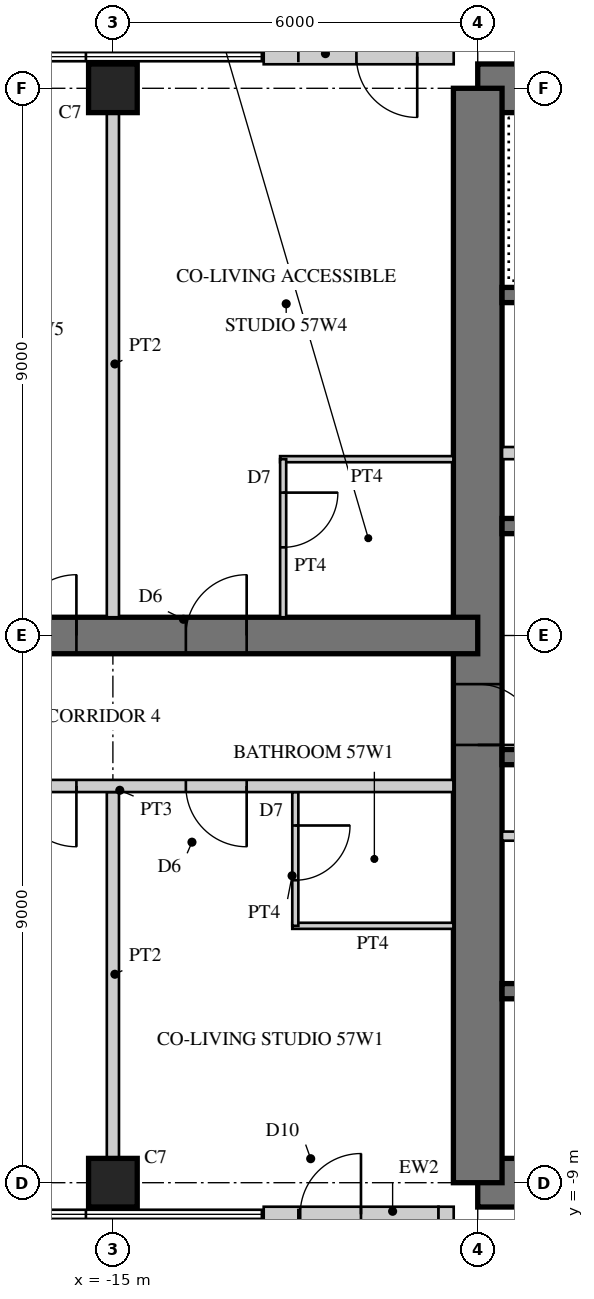
"""IFC4 building model, lengths in metres.
Left out: names, types, materials, properties, quantities, classifications, styles, units other than length and angle.
Written with IfcOpenShell. Run it as: python <this file> out.ifc"""

import sys

from ifc_helpers import new_model, si_unit, direction, frame, frame_2d, origin, origin_2d, place, context, subcontext, project, spatial, rectangle, hollow_rectangle, extrude, element, fill, save


model = new_model("IFC4")
c1 = context("Model", 3, precision=1e-05, world=origin(), true_north=direction((0.0, 1.0)))
c2 = subcontext(c1, "Body", "Model", "MODEL_VIEW")
j1 = project(units=[si_unit("LENGTHUNIT", "METRE"), si_unit("PLANEANGLEUNIT", "RADIAN")], contexts=[c1])
p1 = place(None, origin())
s1 = spatial("IfcSite", under=j1, at=p1, CompositionType="ELEMENT")
p2 = place(p1, origin())
s2 = spatial("IfcBuilding", under=s1, at=p2, CompositionType="ELEMENT")
p3 = place(p2, frame((0.0, 0.0, 225.5)))
s3 = spatial("IfcBuildingStorey", under=s2, at=p3, CompositionType="ELEMENT", Elevation=225.5)
p4 = place(p3, frame((9.0, 9.0, 0.0), z_axis=(0.0, 0.0, 1.0), x_axis=(-1.0, 0.0, 0.0)))
e1 = element("IfcWall", 1, at=p4, inside=s3, PredefinedType="SHEAR", context=c2, shape_type="SweptSolid", body=[
    extrude(rectangle(XDim=18.0, YDim=0.8, at=frame_2d((9.0, 0.0))), origin(), (0.0, 0.0, 1.0), 3.4),
])
p5 = place(p4, frame((9.8, 0.0, 0.0)))
e2 = element("IfcOpeningElement", 2, at=p5, cuts=e1, PredefinedType="OPENING", context=c2, shape_type="SweptSolid", body=[
    extrude(rectangle(XDim=1.0, YDim=2.4, at=frame_2d((0.5, 1.2))), frame((0.0, 0.41, 0.0), z_axis=(0.0, -1.0, 0.0), x_axis=(1.0, 0.0, 0.0)), (0.0, 0.0, 1.0), 0.82),
])
p6 = place(p3, frame((-9.0, -9.0, 0.0), z_axis=(0.0, 0.0, 1.0), x_axis=(1.0, 0.0, 0.0)))
e3 = element("IfcWall", 3, at=p6, inside=s3, PredefinedType="SHEAR", context=c2, shape_type="SweptSolid", body=[
    extrude(rectangle(XDim=18.0, YDim=0.8, at=frame_2d((9.0, 0.0))), origin(), (0.0, 0.0, 1.0), 3.4),
])
p7 = place(p6, frame((9.8, 0.0, 0.0)))
e4 = element("IfcOpeningElement", 4, at=p7, cuts=e3, PredefinedType="OPENING", context=c2, shape_type="SweptSolid", body=[
    extrude(rectangle(XDim=1.0, YDim=2.4, at=frame_2d((0.5, 1.2))), frame((0.0, 0.41, 0.0), z_axis=(0.0, -1.0, 0.0), x_axis=(1.0, 0.0, 0.0)), (0.0, 0.0, 1.0), 0.82),
])
p8 = place(p3, frame((-9.0, 9.0, 0.0), z_axis=(0.0, 0.0, 1.0), x_axis=(0.0, -1.0, 0.0)))
e5 = element("IfcWall", 5, at=p8, inside=s3, PredefinedType="SHEAR", context=c2, shape_type="SweptSolid", body=[
    extrude(rectangle(XDim=18.0, YDim=0.8, at=frame_2d((9.0, 0.0))), origin(), (0.0, 0.0, 1.0), 3.4),
])
p9 = place(p8, frame((9.8, 0.0, 0.0)))
e6 = element("IfcOpeningElement", 6, at=p9, cuts=e5, PredefinedType="OPENING", context=c2, shape_type="SweptSolid", body=[
    extrude(rectangle(XDim=1.0, YDim=2.4, at=frame_2d((0.5, 1.2))), frame((0.0, 0.41, 0.0), z_axis=(0.0, -1.0, 0.0), x_axis=(1.0, 0.0, 0.0)), (0.0, 0.0, 1.0), 0.82),
])
p10 = place(p3, frame((-2.125, 1.8, 0.0), z_axis=(0.0, 0.0, 1.0), x_axis=(-1.0, 0.0, 0.0)))
e7 = element("IfcWall", 7, at=p10, inside=s3, PredefinedType="SHEAR", context=c2, shape_type="SweptSolid", body=[
    extrude(rectangle(XDim=6.475, YDim=0.25, at=frame_2d((3.238, 0.0))), origin(), (0.0, 0.0, 1.0), 3.4),
])
p11 = place(p3, frame((-2.125, 5.6, 0.0), z_axis=(0.0, 0.0, 1.0), x_axis=(-1.0, 0.0, 0.0)))
e8 = element("IfcWall", 8, at=p11, inside=s3, PredefinedType="SHEAR", context=c2, shape_type="SweptSolid", body=[
    extrude(rectangle(XDim=6.475, YDim=0.25, at=frame_2d((3.238, 0.0))), origin(), (0.0, 0.0, 1.0), 3.4),
])
p12 = place(p11, frame((0.175, 0.0, 0.0)))
e9 = element("IfcOpeningElement", 9, at=p12, cuts=e8, PredefinedType="OPENING", context=c2, shape_type="SweptSolid", body=[
    extrude(rectangle(XDim=1.0, YDim=2.1, at=frame_2d((0.5, 1.05))), frame((0.0, 0.135, 0.0), z_axis=(0.0, -1.0, 0.0), x_axis=(1.0, 0.0, 0.0)), (0.0, 0.0, 1.0), 0.27),
])
p13 = place(p3, frame((-5.725, 3.0, 0.0), z_axis=(0.0, 0.0, 1.0), x_axis=(-1.0, 0.0, 0.0)))
e10 = element("IfcWall", 10, at=p13, inside=s3, PredefinedType="PARTITIONING", context=c2, shape_type="SweptSolid", body=[
    extrude(rectangle(XDim=2.875, YDim=0.2, at=frame_2d((1.438, 0.0))), origin(), (0.0, 0.0, 1.0), 3.4),
])
p14 = place(p3, frame((-1.925, -2.0, 0.0), z_axis=(0.0, 0.0, 1.0), x_axis=(-1.0, 0.0, 0.0)))
e11 = element("IfcWall", 11, at=p14, inside=s3, PredefinedType="SHEAR", context=c2, shape_type="SweptSolid", body=[
    extrude(rectangle(XDim=6.675, YDim=0.25, at=frame_2d((3.337, 0.0))), origin(), (0.0, 0.0, 1.0), 3.4),
])
p15 = place(p3, frame((-1.925, -5.85, 0.0), z_axis=(0.0, 0.0, 1.0), x_axis=(-1.0, 0.0, 0.0)))
e12 = element("IfcWall", 12, at=p15, inside=s3, PredefinedType="SHEAR", context=c2, shape_type="SweptSolid", body=[
    extrude(rectangle(XDim=6.675, YDim=0.25, at=frame_2d((3.337, 0.0))), origin(), (0.0, 0.0, 1.0), 3.4),
])
p16 = place(p15, frame((0.496, 0.0, 0.0)))
e13 = element("IfcOpeningElement", 13, at=p16, cuts=e12, PredefinedType="OPENING", context=c2, shape_type="SweptSolid", body=[
    extrude(rectangle(XDim=1.1, YDim=2.2, at=frame_2d((0.55, 1.1))), frame((0.0, 0.135, 0.0), z_axis=(0.0, -1.0, 0.0), x_axis=(1.0, 0.0, 0.0)), (0.0, 0.0, 1.0), 0.27),
])
p17 = place(p15, frame((2.788, 0.0, 0.0)))
e14 = element("IfcOpeningElement", 14, at=p17, cuts=e12, PredefinedType="OPENING", context=c2, shape_type="SweptSolid", body=[
    extrude(rectangle(XDim=1.1, YDim=2.2, at=frame_2d((0.55, 1.1))), frame((0.0, 0.135, 0.0), z_axis=(0.0, -1.0, 0.0), x_axis=(1.0, 0.0, 0.0)), (0.0, 0.0, 1.0), 0.27),
])
p18 = place(p15, frame((5.079, 0.0, 0.0)))
e15 = element("IfcOpeningElement", 15, at=p18, cuts=e12, PredefinedType="OPENING", context=c2, shape_type="SweptSolid", body=[
    extrude(rectangle(XDim=1.1, YDim=2.2, at=frame_2d((0.55, 1.1))), frame((0.0, 0.135, 0.0), z_axis=(0.0, -1.0, 0.0), x_axis=(1.0, 0.0, 0.0)), (0.0, 0.0, 1.0), 0.27),
])
p19 = place(p3, frame((-1.925, -3.3, 0.0), z_axis=(0.0, 0.0, 1.0), x_axis=(-1.0, 0.0, 0.0)))
e16 = element("IfcWall", 16, at=p19, inside=s3, PredefinedType="PARTITIONING", context=c2, shape_type="SweptSolid", body=[
    extrude(rectangle(XDim=6.675, YDim=0.15, at=frame_2d((3.337, 0.0))), origin(), (0.0, 0.0, 1.0), 3.4),
])
p20 = place(p19, frame((0.075, 0.0, 0.0)))
e17 = element("IfcOpeningElement", 17, at=p20, cuts=e16, PredefinedType="OPENING", context=c2, shape_type="SweptSolid", body=[
    extrude(rectangle(XDim=0.8, YDim=2.1, at=frame_2d((0.4, 1.05))), frame((0.0, 0.085, 0.0), z_axis=(0.0, -1.0, 0.0), x_axis=(1.0, 0.0, 0.0)), (0.0, 0.0, 1.0), 0.17),
])
p21 = place(p19, frame((3.675, 0.0, 0.0)))
e18 = element("IfcOpeningElement", 18, at=p21, cuts=e16, PredefinedType="OPENING", context=c2, shape_type="SweptSolid", body=[
    extrude(rectangle(XDim=0.8, YDim=2.1, at=frame_2d((0.4, 1.05))), frame((0.0, 0.085, 0.0), z_axis=(0.0, -1.0, 0.0), x_axis=(1.0, 0.0, 0.0)), (0.0, 0.0, 1.0), 0.17),
])
p22 = place(p3, frame((-9.0, 0.0, 0.0), z_axis=(0.0, 0.0, 1.0), x_axis=(-1.0, 0.0, 0.0)))
e19 = element("IfcWall", 19, at=p22, inside=s3, PredefinedType="SHEAR", context=c2, shape_type="SweptSolid", body=[
    extrude(rectangle(XDim=18.0, YDim=0.6, at=frame_2d((9.0, 0.0))), origin(), (0.0, 0.0, 1.0), 3.4),
])
p23 = place(p22, frame((3.8, 0.0, 0.0)))
e20 = element("IfcOpeningElement", 20, at=p23, cuts=e19, PredefinedType="OPENING", context=c2, shape_type="SweptSolid", body=[
    extrude(rectangle(XDim=1.0, YDim=2.15, at=frame_2d((0.5, 1.075))), frame((0.0, 0.31, 0.0), z_axis=(0.0, -1.0, 0.0), x_axis=(1.0, 0.0, 0.0)), (0.0, 0.0, 1.0), 0.62),
])
p24 = place(p22, frame((6.6, 0.0, 0.0)))
e21 = element("IfcOpeningElement", 21, at=p24, cuts=e19, PredefinedType="OPENING", context=c2, shape_type="SweptSolid", body=[
    extrude(rectangle(XDim=1.0, YDim=2.15, at=frame_2d((0.5, 1.075))), frame((0.0, 0.31, 0.0), z_axis=(0.0, -1.0, 0.0), x_axis=(1.0, 0.0, 0.0)), (0.0, 0.0, 1.0), 0.62),
])
p25 = place(p22, frame((13.3, 0.0, 0.0)))
e22 = element("IfcOpeningElement", 22, at=p25, cuts=e19, PredefinedType="OPENING", context=c2, shape_type="SweptSolid", body=[
    extrude(rectangle(XDim=1.0, YDim=2.2, at=frame_2d((0.5, 1.1))), frame((0.0, 0.31, 0.0), z_axis=(0.0, -1.0, 0.0), x_axis=(1.0, 0.0, 0.0)), (0.0, 0.0, 1.0), 0.62),
])
for number, where, z_axis, x_axis in (
    (23, (-15.0, 9.0, 0.0), (0.0, 0.0, 1.0), (1.0, 0.0, 0.0)),
    (24, (-15.0, -9.0, 0.0), (0.0, 0.0, 1.0), (1.0, 0.0, 0.0)),
):
    element("IfcColumn", number, at=place(p3, frame(where, z_axis=z_axis, x_axis=x_axis)), inside=s3, PredefinedType="COLUMN", context=c2, shape_type="SweptSolid", body=[
        extrude(rectangle(XDim=0.8, YDim=0.8, at=origin_2d()), origin(), (0.0, 0.0, 1.0), 3.4),
    ])
p26 = place(p3, frame((-9.395, 9.52, 0.0), z_axis=(0.0, 0.0, 1.0), x_axis=(-1.0, 0.0, 0.0)))
e25 = element("IfcWall", 25, at=p26, inside=s3, PredefinedType="SOLIDWALL", context=c2, shape_type="SweptSolid", body=[
    extrude(rectangle(XDim=3.125, YDim=0.25, at=frame_2d((1.562, 0.0))), origin(), (0.0, 0.0, 1.0), 3.22),
])
p27 = place(p26, frame((0.6, 0.0, 0.0)))
e26 = element("IfcOpeningElement", 26, at=p27, cuts=e25, PredefinedType="OPENING", context=c2, shape_type="SweptSolid", body=[
    extrude(rectangle(XDim=1.0, YDim=2.2, at=frame_2d((0.5, 1.1))), frame((0.0, 0.135, 0.0), z_axis=(0.0, -1.0, 0.0), x_axis=(1.0, 0.0, 0.0)), (0.0, 0.0, 1.0), 0.27),
])
p28 = place(p3, frame((-12.52, -9.52, 0.0), z_axis=(0.0, 0.0, 1.0), x_axis=(1.0, 0.0, 0.0)))
e27 = element("IfcWall", 27, at=p28, inside=s3, PredefinedType="SOLIDWALL", context=c2, shape_type="SweptSolid", body=[
    extrude(rectangle(XDim=2.875, YDim=0.25, at=frame_2d((1.438, 0.0))), origin(), (0.0, 0.0, 1.0), 3.22),
])
p29 = place(p28, frame((0.6, 0.0, 0.0)))
e28 = element("IfcOpeningElement", 28, at=p29, cuts=e27, PredefinedType="OPENING", context=c2, shape_type="SweptSolid", body=[
    extrude(rectangle(XDim=1.0, YDim=2.2, at=frame_2d((0.5, 1.1))), frame((0.0, 0.135, 0.0), z_axis=(0.0, -1.0, 0.0), x_axis=(1.0, 0.0, 0.0)), (0.0, 0.0, 1.0), 0.27),
])
p30 = place(p3, frame((-9.52, -9.395, 0.0), z_axis=(0.0, 0.0, 1.0), x_axis=(0.0, -1.0, 0.0)))
e29 = element("IfcWall", 29, at=p30, inside=s3, PredefinedType="SOLIDWALL", context=c2, shape_type="SweptSolid", body=[
    extrude(rectangle(XDim=3.125, YDim=0.25, at=frame_2d((1.562, 0.0))), origin(), (0.0, 0.0, 1.0), 3.22),
])
p31 = place(p30, frame((0.6, 0.0, 0.0)))
e30 = element("IfcOpeningElement", 30, at=p31, cuts=e29, PredefinedType="OPENING", context=c2, shape_type="SweptSolid", body=[
    extrude(rectangle(XDim=1.0, YDim=2.2, at=frame_2d((0.5, 1.1))), frame((0.0, 0.135, 0.0), z_axis=(0.0, -1.0, 0.0), x_axis=(1.0, 0.0, 0.0)), (0.0, 0.0, 1.0), 0.27),
])
p32 = place(p3, frame((-9.4, -4.775, 0.0), z_axis=(0.0, 0.0, 1.0), x_axis=(-1.0, 0.0, 0.0)))
e31 = element("IfcWall", 31, at=p32, inside=s3, PredefinedType="PARTITIONING", context=c2, shape_type="SweptSolid", body=[
    extrude(rectangle(XDim=2.65, YDim=0.1, at=frame_2d((1.325, 0.0))), origin(), (0.0, 0.0, 1.0), 3.22),
])
p33 = place(p3, frame((-12.0, -2.575, 0.0), z_axis=(0.0, 0.0, 1.0), x_axis=(0.0, -1.0, 0.0)))
e32 = element("IfcWall", 32, at=p33, inside=s3, PredefinedType="PARTITIONING", context=c2, shape_type="SweptSolid", body=[
    extrude(rectangle(XDim=2.2, YDim=0.1, at=frame_2d((1.1, 0.0))), origin(), (0.0, 0.0, 1.0), 3.22),
])
p34 = place(p33, frame((0.55, 0.0, 0.0)))
e33 = element("IfcOpeningElement", 33, at=p34, cuts=e32, PredefinedType="OPENING", context=c2, shape_type="SweptSolid", body=[
    extrude(rectangle(XDim=0.9, YDim=2.1, at=frame_2d((0.45, 1.05))), frame((0.0, 0.06, 0.0), z_axis=(0.0, -1.0, 0.0), x_axis=(1.0, 0.0, 0.0)), (0.0, 0.0, 1.0), 0.12),
])
p35 = place(p3, frame((-9.4, 2.9, 0.0), z_axis=(0.0, 0.0, 1.0), x_axis=(-1.0, 0.0, 0.0)))
e34 = element("IfcWall", 34, at=p35, inside=s3, PredefinedType="PARTITIONING", context=c2, shape_type="SweptSolid", body=[
    extrude(rectangle(XDim=2.85, YDim=0.1, at=frame_2d((1.425, 0.0))), origin(), (0.0, 0.0, 1.0), 3.22),
])
p36 = place(p3, frame((-12.2, 2.9, 0.0), z_axis=(0.0, 0.0, 1.0), x_axis=(0.0, -1.0, 0.0)))
e35 = element("IfcWall", 35, at=p36, inside=s3, PredefinedType="PARTITIONING", context=c2, shape_type="SweptSolid", body=[
    extrude(rectangle(XDim=2.6, YDim=0.1, at=frame_2d((1.3, 0.0))), origin(), (0.0, 0.0, 1.0), 3.22),
])
p37 = place(p36, frame((0.55, 0.0, 0.0)))
e36 = element("IfcOpeningElement", 36, at=p37, cuts=e35, PredefinedType="OPENING", context=c2, shape_type="SweptSolid", body=[
    extrude(rectangle(XDim=0.9, YDim=2.1, at=frame_2d((0.45, 1.05))), frame((0.0, 0.06, 0.0), z_axis=(0.0, -1.0, 0.0), x_axis=(1.0, 0.0, 0.0)), (0.0, 0.0, 1.0), 0.12),
])
p38 = place(p3, frame((-15.0, -2.575, 0.0), z_axis=(0.0, 0.0, 1.0), x_axis=(0.0, -1.0, 0.0)))
e37 = element("IfcWall", 37, at=p38, inside=s3, PredefinedType="SOLIDWALL", context=c2, shape_type="SweptSolid", body=[
    extrude(rectangle(XDim=6.025, YDim=0.2, at=frame_2d((3.013, 0.0))), origin(), (0.0, 0.0, 1.0), 2.52),
])
p39 = place(p3, frame((-15.0, 8.6, 0.0), z_axis=(0.0, 0.0, 1.0), x_axis=(0.0, -1.0, 0.0)))
e38 = element("IfcWall", 38, at=p39, inside=s3, PredefinedType="SOLIDWALL", context=c2, shape_type="SweptSolid", body=[
    extrude(rectangle(XDim=8.3, YDim=0.2, at=frame_2d((4.15, 0.0))), origin(), (0.0, 0.0, 1.0), 2.52),
])
p40 = place(p3, frame((-9.4, -2.475, 0.0), z_axis=(0.0, 0.0, 1.0), x_axis=(-1.0, 0.0, 0.0)))
e39 = element("IfcWall", 39, at=p40, inside=s3, PredefinedType="SOLIDWALL", context=c2, shape_type="SweptSolid", body=[
    extrude(rectangle(XDim=11.6, YDim=0.2, at=frame_2d((5.8, 0.0))), origin(), (0.0, 0.0, 1.0), 3.22),
])
p41 = place(p40, frame((3.4, 0.0, 0.0)))
e40 = element("IfcOpeningElement", 40, at=p41, cuts=e39, PredefinedType="OPENING", context=c2, shape_type="SweptSolid", body=[
    extrude(rectangle(XDim=1.0, YDim=2.15, at=frame_2d((0.5, 1.075))), frame((0.0, 0.11, 0.0), z_axis=(0.0, -1.0, 0.0), x_axis=(1.0, 0.0, 0.0)), (0.0, 0.0, 1.0), 0.22),
])
p42 = place(p40, frame((6.2, 0.0, 0.0)))
e41 = element("IfcOpeningElement", 41, at=p42, cuts=e39, PredefinedType="OPENING", context=c2, shape_type="SweptSolid", body=[
    extrude(rectangle(XDim=1.0, YDim=2.15, at=frame_2d((0.5, 1.075))), frame((0.0, 0.11, 0.0), z_axis=(0.0, -1.0, 0.0), x_axis=(1.0, 0.0, 0.0)), (0.0, 0.0, 1.0), 0.22),
])
p43 = place(p27, origin())
e42 = element("IfcDoor", 42, at=p43, inside=s3, OperationType="SINGLE_SWING_LEFT", PredefinedType="DOOR", context=c2, shape_type="SweptSolid", body=[
    extrude(hollow_rectangle(XDim=1.0, YDim=2.2, WallThickness=0.06, at=frame_2d((0.5, 1.1))), frame((0.0, 0.025, 0.0), z_axis=(0.0, -1.0, 0.0), x_axis=(1.0, 0.0, 0.0)), (0.0, 0.0, 1.0), 0.05),
    extrude(rectangle(XDim=0.879, YDim=2.079, at=frame_2d((0.5, 1.1))), frame((0.0, 0.025, 0.0), z_axis=(0.0, -1.0, 0.0), x_axis=(1.0, 0.0, 0.0)), (0.0, 0.0, 1.0), 0.05),
])
fill(e26, e42)
p44 = place(p29, origin())
e43 = element("IfcDoor", 43, at=p44, inside=s3, OperationType="SINGLE_SWING_RIGHT", PredefinedType="DOOR", context=c2, shape_type="SweptSolid", body=[
    extrude(hollow_rectangle(XDim=1.0, YDim=2.2, WallThickness=0.06, at=frame_2d((0.5, 1.1))), frame((0.0, 0.025, 0.0), z_axis=(0.0, -1.0, 0.0), x_axis=(1.0, 0.0, 0.0)), (0.0, 0.0, 1.0), 0.05),
    extrude(rectangle(XDim=0.879, YDim=2.079, at=frame_2d((0.5, 1.1))), frame((0.0, 0.025, 0.0), z_axis=(0.0, -1.0, 0.0), x_axis=(1.0, 0.0, 0.0)), (0.0, 0.0, 1.0), 0.05),
])
fill(e28, e43)
p45 = place(p34, origin())
e44 = element("IfcDoor", 44, at=p45, inside=s3, OperationType="SINGLE_SWING_LEFT", PredefinedType="DOOR", context=c2, shape_type="SweptSolid", body=[
    extrude(rectangle(XDim=0.9, YDim=2.1, at=frame_2d((0.45, 1.05))), frame((0.0, 0.025, 0.0), z_axis=(0.0, -1.0, 0.0), x_axis=(1.0, 0.0, 0.0)), (0.0, 0.0, 1.0), 0.05),
])
fill(e33, e44)
p46 = place(p37, origin())
e45 = element("IfcDoor", 45, at=p46, inside=s3, OperationType="SINGLE_SWING_LEFT", PredefinedType="DOOR", context=c2, shape_type="SweptSolid", body=[
    extrude(rectangle(XDim=0.9, YDim=2.1, at=frame_2d((0.45, 1.05))), frame((0.0, 0.025, 0.0), z_axis=(0.0, -1.0, 0.0), x_axis=(1.0, 0.0, 0.0)), (0.0, 0.0, 1.0), 0.05),
])
fill(e36, e45)
p47 = place(p41, origin())
e46 = element("IfcDoor", 46, at=p47, inside=s3, OperationType="SINGLE_SWING_LEFT", PredefinedType="DOOR", context=c2, shape_type="SweptSolid", body=[
    extrude(rectangle(XDim=1.0, YDim=2.15, at=frame_2d((0.5, 1.075))), frame((0.0, 0.025, 0.0), z_axis=(0.0, -1.0, 0.0), x_axis=(1.0, 0.0, 0.0)), (0.0, 0.0, 1.0), 0.05),
])
fill(e40, e46)
p48 = place(p42, origin())
e47 = element("IfcDoor", 47, at=p48, inside=s3, OperationType="SINGLE_SWING_LEFT", PredefinedType="DOOR", context=c2, shape_type="SweptSolid", body=[
    extrude(rectangle(XDim=1.0, YDim=2.15, at=frame_2d((0.5, 1.075))), frame((0.0, 0.025, 0.0), z_axis=(0.0, -1.0, 0.0), x_axis=(1.0, 0.0, 0.0)), (0.0, 0.0, 1.0), 0.05),
])
fill(e41, e47)
p49 = place(p23, frame((1.0, 0.0, 0.0), z_axis=(0.0, 0.0, 1.0), x_axis=(-1.0, 0.0, 0.0)))
e48 = element("IfcDoor", 48, at=p49, inside=s3, OperationType="SINGLE_SWING_RIGHT", PredefinedType="DOOR", context=c2, shape_type="SweptSolid", body=[
    extrude(rectangle(XDim=1.0, YDim=2.15, at=frame_2d((0.5, 1.075))), frame((0.0, 0.025, 0.0), z_axis=(0.0, -1.0, 0.0), x_axis=(1.0, 0.0, 0.0)), (0.0, 0.0, 1.0), 0.05),
])
fill(e20, e48)
p50 = place(p24, frame((1.0, 0.0, 0.0), z_axis=(0.0, 0.0, 1.0), x_axis=(-1.0, 0.0, 0.0)))
e49 = element("IfcDoor", 49, at=p50, inside=s3, OperationType="SINGLE_SWING_RIGHT", PredefinedType="DOOR", context=c2, shape_type="SweptSolid", body=[
    extrude(rectangle(XDim=1.0, YDim=2.15, at=frame_2d((0.5, 1.075))), frame((0.0, 0.025, 0.0), z_axis=(0.0, -1.0, 0.0), x_axis=(1.0, 0.0, 0.0)), (0.0, 0.0, 1.0), 0.05),
])
fill(e21, e49)
p51 = place(p9, origin())
e50 = element("IfcDoor", 50, at=p51, inside=s3, OperationType="SINGLE_SWING_RIGHT", PredefinedType="DOOR", context=c2, shape_type="SweptSolid", body=[
    extrude(rectangle(XDim=1.0, YDim=2.4, at=frame_2d((0.5, 1.2))), frame((0.0, 0.055, 0.0), z_axis=(0.0, -1.0, 0.0), x_axis=(1.0, 0.0, 0.0)), (0.0, 0.0, 1.0), 0.05),
])
fill(e6, e50)
save(model, sys.argv[1])
